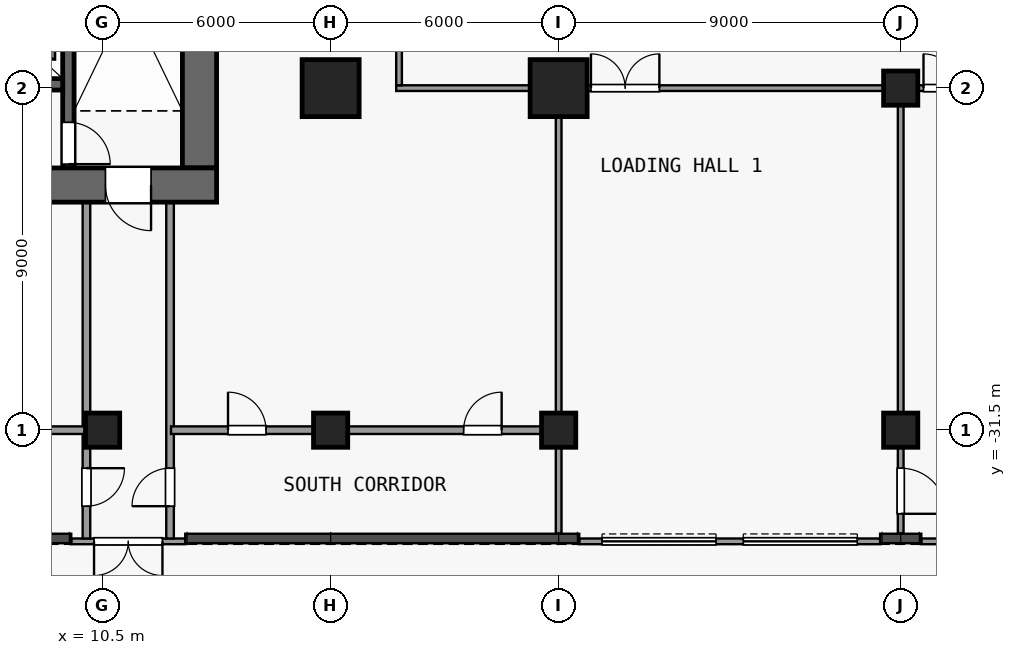
"""IFC4 building model, lengths in metres.
Left out: names, types, materials, properties, quantities, classifications, styles, units other than length and angle.
Written with IfcOpenShell. Run it as: python <this file> out.ifc"""

import sys

from ifc_helpers import new_model, si_unit, direction, frame, frame_2d, origin, origin_2d, place, context, subcontext, project, spatial, rectangle, extrude, element, fill, save


model = new_model("IFC4")
c1 = context("Model", 3, precision=1e-05, world=origin(), true_north=direction((0.0, 1.0)))
c2 = subcontext(c1, "Body", "Model", "MODEL_VIEW")
j1 = project(units=[si_unit("LENGTHUNIT", "METRE"), si_unit("PLANEANGLEUNIT", "RADIAN")], contexts=[c1])
p1 = place(None, origin())
s1 = spatial("IfcSite", under=j1, at=p1, CompositionType="ELEMENT")
p2 = place(p1, origin())
s2 = spatial("IfcBuilding", under=s1, at=p2, CompositionType="ELEMENT")
p3 = place(p2, origin())
s3 = spatial("IfcBuildingStorey", under=s2, at=p3, CompositionType="ELEMENT", Elevation=0.0)
for number, where, z_axis, x_axis in (
    (1, (10.5, -31.5, 0.0), (0.0, 0.0, 1.0), (1.0, 0.0, 0.0)),
    (2, (16.5, -31.5, 0.0), (0.0, 0.0, 1.0), (1.0, 0.0, 0.0)),
):
    element("IfcColumn", number, at=place(p3, frame(where, z_axis=z_axis, x_axis=x_axis)), inside=s3, PredefinedType="COLUMN", context=c2, shape_type="SweptSolid", body=[
        extrude(rectangle(XDim=0.9, YDim=0.9, at=origin_2d()), origin(), (0.0, 0.0, 1.0), 8.0),
    ])
p4 = place(p3, frame((16.5, -22.5, 0.0), z_axis=(0.0, 0.0, 1.0), x_axis=(1.0, 0.0, 0.0)))
e3 = element("IfcColumn", 3, at=p4, inside=s3, PredefinedType="COLUMN", context=c2, shape_type="SweptSolid", body=[
    extrude(rectangle(XDim=1.5, YDim=1.5, at=origin_2d()), origin(), (0.0, 0.0, 1.0), 8.0),
])
p5 = place(p3, frame((22.5, -31.5, 0.0), z_axis=(0.0, 0.0, 1.0), x_axis=(1.0, 0.0, 0.0)))
e4 = element("IfcColumn", 4, at=p5, inside=s3, PredefinedType="COLUMN", context=c2, shape_type="SweptSolid", body=[
    extrude(rectangle(XDim=0.9, YDim=0.9, at=origin_2d()), origin(), (0.0, 0.0, 1.0), 8.0),
])
p6 = place(p3, frame((22.5, -22.5, 0.0), z_axis=(0.0, 0.0, 1.0), x_axis=(1.0, 0.0, 0.0)))
e5 = element("IfcColumn", 5, at=p6, inside=s3, PredefinedType="COLUMN", context=c2, shape_type="SweptSolid", body=[
    extrude(rectangle(XDim=1.5, YDim=1.5, at=origin_2d()), origin(), (0.0, 0.0, 1.0), 8.0),
])
for number, where, z_axis, x_axis in (
    (6, (31.5, -31.5, 0.0), (0.0, 0.0, 1.0), (1.0, 0.0, 0.0)),
    (7, (31.5, -22.5, 0.0), (0.0, 0.0, 1.0), (1.0, 0.0, 0.0)),
):
    element("IfcColumn", number, at=place(p3, frame(where, z_axis=z_axis, x_axis=x_axis)), inside=s3, PredefinedType="COLUMN", context=c2, shape_type="SweptSolid", body=[
        extrude(rectangle(XDim=0.9, YDim=0.9, at=origin_2d()), origin(), (0.0, 0.0, 1.0), 8.0),
    ])
p7 = place(p3, frame((13.5, -25.05, 0.0), z_axis=(0.0, 0.0, 1.0), x_axis=(-1.0, 0.0, 0.0)))
e8 = element("IfcWall", 8, at=p7, inside=s3, PredefinedType="SHEAR", context=c2, shape_type="SweptSolid", body=[
    extrude(rectangle(XDim=27.0, YDim=0.9, at=frame_2d((13.5, 0.0))), origin(), (0.0, 0.0, 1.0), 7.65),
])
p8 = place(p7, frame((24.075, 0.0, 0.0)))
e9 = element("IfcOpeningElement", 9, at=p8, cuts=e8, PredefinedType="OPENING", context=c2, shape_type="SweptSolid", body=[
    extrude(rectangle(XDim=1.2, YDim=2.1, at=frame_2d((0.6, 1.05))), frame((0.0, 0.46, 0.0), z_axis=(0.0, -1.0, 0.0), x_axis=(1.0, 0.0, 0.0)), (0.0, 0.0, 1.0), 0.92),
])
p9 = place(p7, frame((1.725, 0.0, 0.0)))
e10 = element("IfcOpeningElement", 10, at=p9, cuts=e8, PredefinedType="OPENING", context=c2, shape_type="SweptSolid", body=[
    extrude(rectangle(XDim=1.2, YDim=2.1, at=frame_2d((0.6, 1.05))), frame((0.0, 0.46, 0.0), z_axis=(0.0, -1.0, 0.0), x_axis=(1.0, 0.0, 0.0)), (0.0, 0.0, 1.0), 0.92),
])
p10 = place(p3, frame((13.05, -24.6, 0.0), z_axis=(0.0, 0.0, 1.0), x_axis=(0.0, 1.0, 0.0)))
e11 = element("IfcWall", 11, at=p10, inside=s3, PredefinedType="SHEAR", context=c2, shape_type="SweptSolid", body=[
    extrude(rectangle(XDim=16.1, YDim=0.9, at=frame_2d((8.05, 0.0))), origin(), (0.0, 0.0, 1.0), 7.65),
])
p11 = place(p3, frame((6.35, -22.4, 0.0), z_axis=(0.0, 0.0, 1.0), x_axis=(1.0, 0.0, 0.0)))
e12 = element("IfcWall", 12, at=p11, inside=s3, PredefinedType="SHEAR", context=c2, shape_type="SweptSolid", body=[
    extrude(rectangle(XDim=3.1, YDim=0.3, at=frame_2d((1.55, 0.0))), origin(), (0.0, 0.0, 1.0), 7.65),
])
p12 = place(p3, frame((9.6, -16.9, 0.0), z_axis=(0.0, 0.0, 1.0), x_axis=(0.0, -1.0, 0.0)))
e13 = element("IfcWall", 13, at=p12, inside=s3, PredefinedType="SHEAR", context=c2, shape_type="SweptSolid", body=[
    extrude(rectangle(XDim=7.7, YDim=0.3, at=frame_2d((3.85, 0.0))), origin(), (0.0, 0.0, 1.0), 7.65),
])
p13 = place(p12, frame((6.5, 0.0, 0.0)))
e14 = element("IfcOpeningElement", 14, at=p13, cuts=e13, PredefinedType="OPENING", context=c2, shape_type="SweptSolid", body=[
    extrude(rectangle(XDim=1.1, YDim=2.1, at=frame_2d((0.55, 1.05))), frame((0.0, 0.16, 0.0), z_axis=(0.0, -1.0, 0.0), x_axis=(1.0, 0.0, 0.0)), (0.0, 0.0, 1.0), 0.32),
])
p14 = place(p3, frame((10.075, -25.5, 0.0), z_axis=(0.0, 0.0, 1.0), x_axis=(0.0, -1.0, 0.0)))
e15 = element("IfcWall", 15, at=p14, inside=s3, PredefinedType="PARTITIONING", context=c2, shape_type="SweptSolid", body=[
    extrude(rectangle(XDim=8.85, YDim=0.2, at=frame_2d((4.425, 0.0))), origin(), (0.0, 0.0, 1.0), 7.65),
])
p15 = place(p14, frame((7.0, 0.0, 0.0)))
e16 = element("IfcOpeningElement", 16, at=p15, cuts=e15, PredefinedType="OPENING", context=c2, shape_type="SweptSolid", body=[
    extrude(rectangle(XDim=1.0, YDim=2.1, at=frame_2d((0.5, 1.05))), frame((0.0, 0.11, 0.0), z_axis=(0.0, -1.0, 0.0), x_axis=(1.0, 0.0, 0.0)), (0.0, 0.0, 1.0), 0.22),
])
p16 = place(p3, frame((12.275, -34.35, 0.0), z_axis=(0.0, 0.0, 1.0), x_axis=(0.0, 1.0, 0.0)))
e17 = element("IfcWall", 17, at=p16, inside=s3, PredefinedType="PARTITIONING", context=c2, shape_type="SweptSolid", body=[
    extrude(rectangle(XDim=8.85, YDim=0.2, at=frame_2d((4.425, 0.0))), origin(), (0.0, 0.0, 1.0), 7.65),
])
p17 = place(p16, frame((0.85, 0.0, 0.0)))
e18 = element("IfcOpeningElement", 18, at=p17, cuts=e17, PredefinedType="OPENING", context=c2, shape_type="SweptSolid", body=[
    extrude(rectangle(XDim=1.0, YDim=2.1, at=frame_2d((0.5, 1.05))), frame((0.0, 0.11, 0.0), z_axis=(0.0, -1.0, 0.0), x_axis=(1.0, 0.0, 0.0)), (0.0, 0.0, 1.0), 0.22),
])
p18 = place(p3, frame((18.225, -22.5, 0.0), z_axis=(0.0, 0.0, 1.0), x_axis=(1.0, 0.0, 0.0)))
e19 = element("IfcWall", 19, at=p18, inside=s3, PredefinedType="PARTITIONING", context=c2, shape_type="SweptSolid", body=[
    extrude(rectangle(XDim=3.525, YDim=0.15, at=frame_2d((1.762, 0.0))), origin(), (0.0, 0.0, 1.0), 7.65),
])
p19 = place(p3, frame((23.25, -22.5, 0.0), z_axis=(0.0, 0.0, 1.0), x_axis=(1.0, 0.0, 0.0)))
e20 = element("IfcWall", 20, at=p19, inside=s3, PredefinedType="PARTITIONING", context=c2, shape_type="SweptSolid", body=[
    extrude(rectangle(XDim=7.8, YDim=0.15, at=frame_2d((3.9, 0.0))), origin(), (0.0, 0.0, 1.0), 7.65),
])
p20 = place(p19, frame((0.1, 0.0, 0.0)))
e21 = element("IfcOpeningElement", 21, at=p20, cuts=e20, PredefinedType="OPENING", context=c2, shape_type="SweptSolid", body=[
    extrude(rectangle(XDim=1.8, YDim=2.1, at=frame_2d((0.9, 1.05))), frame((0.0, 0.085, 0.0), z_axis=(0.0, -1.0, 0.0), x_axis=(1.0, 0.0, 0.0)), (0.0, 0.0, 1.0), 0.17),
])
p21 = place(p3, frame((31.95, -22.5, 0.0), z_axis=(0.0, 0.0, 1.0), x_axis=(1.0, 0.0, 0.0)))
e22 = element("IfcWall", 22, at=p21, inside=s3, PredefinedType="PARTITIONING", context=c2, shape_type="SweptSolid", body=[
    extrude(rectangle(XDim=8.1, YDim=0.15, at=frame_2d((4.05, 0.0))), origin(), (0.0, 0.0, 1.0), 7.65),
])
p22 = place(p21, frame((0.15, 0.0, 0.0)))
e23 = element("IfcOpeningElement", 23, at=p22, cuts=e22, PredefinedType="OPENING", context=c2, shape_type="SweptSolid", body=[
    extrude(rectangle(XDim=1.8, YDim=2.1, at=frame_2d((0.9, 1.05))), frame((0.0, 0.085, 0.0), z_axis=(0.0, -1.0, 0.0), x_axis=(1.0, 0.0, 0.0)), (0.0, 0.0, 1.0), 0.17),
])
p23 = place(p3, frame((18.3, -22.425, 0.0), z_axis=(0.0, 0.0, 1.0), x_axis=(0.0, 1.0, 0.0)))
e24 = element("IfcWall", 24, at=p23, inside=s3, PredefinedType="PARTITIONING", context=c2, shape_type="SweptSolid", body=[
    extrude(rectangle(XDim=14.45, YDim=0.15, at=frame_2d((7.225, 0.0))), origin(), (0.0, 0.0, 1.0), 7.65),
])
p24 = place(p3, frame((22.5, -34.225, 0.0), z_axis=(0.0, 0.0, 1.0), x_axis=(0.0, 1.0, 0.0)))
e25 = element("IfcWall", 25, at=p24, inside=s3, PredefinedType="PARTITIONING", context=c2, shape_type="SweptSolid", body=[
    extrude(rectangle(XDim=2.275, YDim=0.15, at=frame_2d((1.138, 0.0))), origin(), (0.0, 0.0, 1.0), 7.65),
])
p25 = place(p3, frame((22.5, -31.05, 0.0), z_axis=(0.0, 0.0, 1.0), x_axis=(0.0, 1.0, 0.0)))
e26 = element("IfcWall", 26, at=p25, inside=s3, PredefinedType="PARTITIONING", context=c2, shape_type="SweptSolid", body=[
    extrude(rectangle(XDim=7.8, YDim=0.15, at=frame_2d((3.9, 0.0))), origin(), (0.0, 0.0, 1.0), 7.65),
])
p26 = place(p3, frame((31.5, -31.95, 0.0), z_axis=(0.0, 0.0, 1.0), x_axis=(0.0, -1.0, 0.0)))
e27 = element("IfcWall", 27, at=p26, inside=s3, PredefinedType="PARTITIONING", context=c2, shape_type="SweptSolid", body=[
    extrude(rectangle(XDim=2.275, YDim=0.15, at=frame_2d((1.138, 0.0))), origin(), (0.0, 0.0, 1.0), 7.65),
])
p27 = place(p26, frame((0.55, 0.0, 0.0)))
e28 = element("IfcOpeningElement", 28, at=p27, cuts=e27, PredefinedType="OPENING", context=c2, shape_type="SweptSolid", body=[
    extrude(rectangle(XDim=1.2, YDim=2.1, at=frame_2d((0.6, 1.05))), frame((0.0, 0.085, 0.0), z_axis=(0.0, -1.0, 0.0), x_axis=(1.0, 0.0, 0.0)), (0.0, 0.0, 1.0), 0.17),
])
p28 = place(p3, frame((31.5, -31.05, 0.0), z_axis=(0.0, 0.0, 1.0), x_axis=(0.0, 1.0, 0.0)))
e29 = element("IfcWall", 29, at=p28, inside=s3, PredefinedType="PARTITIONING", context=c2, shape_type="SweptSolid", body=[
    extrude(rectangle(XDim=8.1, YDim=0.15, at=frame_2d((4.05, 0.0))), origin(), (0.0, 0.0, 1.0), 7.65),
])
p29 = place(p3, frame((12.675, -34.425, 0.0), z_axis=(0.0, 0.0, 1.0), x_axis=(-1.0, 0.0, 0.0)))
e30 = element("IfcWall", 30, at=p29, inside=s3, PredefinedType="SOLIDWALL", context=c2, shape_type="SweptSolid", body=[
    extrude(rectangle(XDim=3.0, YDim=0.15, at=frame_2d((1.5, 0.0))), origin(), (0.0, 0.0, 1.0), 7.65),
])
p30 = place(p29, frame((0.6, 0.0, 0.0)))
e31 = element("IfcOpeningElement", 31, at=p30, cuts=e30, PredefinedType="OPENING", context=c2, shape_type="SweptSolid", body=[
    extrude(rectangle(XDim=1.8, YDim=2.1, at=frame_2d((0.9, 1.05))), frame((0.0, 0.085, 0.0), z_axis=(0.0, -1.0, 0.0), x_axis=(1.0, 0.0, 0.0)), (0.0, 0.0, 1.0), 0.17),
])
p31 = place(p3, frame((30.958, -34.425, 0.0), z_axis=(0.0, 0.0, 1.0), x_axis=(-1.0, 0.0, 0.0)))
e32 = element("IfcWall", 32, at=p31, inside=s3, PredefinedType="SOLIDWALL", context=c2, shape_type="SweptSolid", body=[
    extrude(rectangle(XDim=7.917, YDim=0.15, at=frame_2d((3.958, 0.0))), origin(), (0.0, 0.0, 1.0), 7.65),
])
p32 = place(p31, frame((4.317, 0.0, 0.0)))
e33 = element("IfcOpeningElement", 33, at=p32, cuts=e32, PredefinedType="OPENING", context=c2, shape_type="SweptSolid", body=[
    extrude(rectangle(XDim=3.0, YDim=4.3, at=frame_2d((1.5, 2.15))), frame((0.0, 0.085, 0.0), z_axis=(0.0, -1.0, 0.0), x_axis=(1.0, 0.0, 0.0)), (0.0, 0.0, 1.0), 0.17),
])
p33 = place(p31, frame((0.6, 0.0, 0.0)))
e34 = element("IfcOpeningElement", 34, at=p33, cuts=e32, PredefinedType="OPENING", context=c2, shape_type="SweptSolid", body=[
    extrude(rectangle(XDim=3.0, YDim=4.3, at=frame_2d((1.5, 2.15))), frame((0.0, 0.085, 0.0), z_axis=(0.0, -1.0, 0.0), x_axis=(1.0, 0.0, 0.0)), (0.0, 0.0, 1.0), 0.17),
])
p34 = place(p3, frame((39.958, -34.425, 0.0), z_axis=(0.0, 0.0, 1.0), x_axis=(-1.0, 0.0, 0.0)))
e35 = element("IfcWall", 35, at=p34, inside=s3, PredefinedType="SOLIDWALL", context=c2, shape_type="SweptSolid", body=[
    extrude(rectangle(XDim=7.917, YDim=0.15, at=frame_2d((3.958, 0.0))), origin(), (0.0, 0.0, 1.0), 7.65),
])
p35 = place(p34, frame((4.317, 0.0, 0.0)))
e36 = element("IfcOpeningElement", 36, at=p35, cuts=e35, PredefinedType="OPENING", context=c2, shape_type="SweptSolid", body=[
    extrude(rectangle(XDim=3.0, YDim=4.3, at=frame_2d((1.5, 2.15))), frame((0.0, 0.085, 0.0), z_axis=(0.0, -1.0, 0.0), x_axis=(1.0, 0.0, 0.0)), (0.0, 0.0, 1.0), 0.17),
])
p36 = place(p34, frame((0.6, 0.0, 0.0)))
e37 = element("IfcOpeningElement", 37, at=p36, cuts=e35, PredefinedType="OPENING", context=c2, shape_type="SweptSolid", body=[
    extrude(rectangle(XDim=3.0, YDim=4.3, at=frame_2d((1.5, 2.15))), frame((0.0, 0.085, 0.0), z_axis=(0.0, -1.0, 0.0), x_axis=(1.0, 0.0, 0.0)), (0.0, 0.0, 1.0), 0.17),
])
p37 = place(p3, frame((-10.05, -31.5, 0.0), z_axis=(0.0, 0.0, 1.0), x_axis=(1.0, 0.0, 0.0)))
e38 = element("IfcWall", 38, at=p37, inside=s3, PredefinedType="PARTITIONING", context=c2, shape_type="SweptSolid", body=[
    extrude(rectangle(XDim=20.1, YDim=0.2, at=frame_2d((10.05, 0.0))), origin(), (0.0, 0.0, 1.0), 7.65),
])
p38 = place(p37, frame((3.5, 0.0, 0.0)))
e39 = element("IfcOpeningElement", 39, at=p38, cuts=e38, PredefinedType="OPENING", context=c2, shape_type="SweptSolid", body=[
    extrude(rectangle(XDim=1.0, YDim=2.1, at=frame_2d((0.5, 1.05))), frame((0.0, 0.11, 0.0), z_axis=(0.0, -1.0, 0.0), x_axis=(1.0, 0.0, 0.0)), (0.0, 0.0, 1.0), 0.22),
])
p39 = place(p37, frame((15.6, 0.0, 0.0)))
e40 = element("IfcOpeningElement", 40, at=p39, cuts=e38, PredefinedType="OPENING", context=c2, shape_type="SweptSolid", body=[
    extrude(rectangle(XDim=1.0, YDim=2.1, at=frame_2d((0.5, 1.05))), frame((0.0, 0.11, 0.0), z_axis=(0.0, -1.0, 0.0), x_axis=(1.0, 0.0, 0.0)), (0.0, 0.0, 1.0), 0.22),
])
p40 = place(p3, frame((12.3, -31.5, 0.0), z_axis=(0.0, 0.0, 1.0), x_axis=(1.0, 0.0, 0.0)))
e41 = element("IfcWall", 41, at=p40, inside=s3, PredefinedType="PARTITIONING", context=c2, shape_type="SweptSolid", body=[
    extrude(rectangle(XDim=10.2, YDim=0.2, at=frame_2d((5.1, 0.0))), origin(), (0.0, 0.0, 1.0), 7.65),
])
p41 = place(p40, frame((1.5, 0.0, 0.0)))
e42 = element("IfcOpeningElement", 42, at=p41, cuts=e41, PredefinedType="OPENING", context=c2, shape_type="SweptSolid", body=[
    extrude(rectangle(XDim=1.0, YDim=2.1, at=frame_2d((0.5, 1.05))), frame((0.0, 0.11, 0.0), z_axis=(0.0, -1.0, 0.0), x_axis=(1.0, 0.0, 0.0)), (0.0, 0.0, 1.0), 0.22),
])
p42 = place(p40, frame((7.7, 0.0, 0.0)))
e43 = element("IfcOpeningElement", 43, at=p42, cuts=e41, PredefinedType="OPENING", context=c2, shape_type="SweptSolid", body=[
    extrude(rectangle(XDim=1.0, YDim=2.1, at=frame_2d((0.5, 1.05))), frame((0.0, 0.11, 0.0), z_axis=(0.0, -1.0, 0.0), x_axis=(1.0, 0.0, 0.0)), (0.0, 0.0, 1.0), 0.22),
])
p43 = place(p9, origin())
e44 = element("IfcDoor", 44, at=p43, inside=s3, OperationType="SINGLE_SWING_LEFT", PredefinedType="DOOR", context=c2, shape_type="SweptSolid", body=[
    extrude(rectangle(XDim=1.2, YDim=2.1, at=frame_2d((0.6, 1.05))), frame((0.0, 0.025, 0.0), z_axis=(0.0, -1.0, 0.0), x_axis=(1.0, 0.0, 0.0)), (0.0, 0.0, 1.0), 0.05),
])
fill(e10, e44)
p44 = place(p13, origin())
e45 = element("IfcDoor", 45, at=p44, inside=s3, OperationType="SINGLE_SWING_RIGHT", PredefinedType="DOOR", context=c2, shape_type="SweptSolid", body=[
    extrude(rectangle(XDim=1.1, YDim=2.1, at=frame_2d((0.55, 1.05))), frame((0.0, 0.025, 0.0), z_axis=(0.0, -1.0, 0.0), x_axis=(1.0, 0.0, 0.0)), (0.0, 0.0, 1.0), 0.05),
])
fill(e14, e45)
p45 = place(p15, origin())
e46 = element("IfcDoor", 46, at=p45, inside=s3, OperationType="SINGLE_SWING_LEFT", PredefinedType="DOOR", context=c2, shape_type="SweptSolid", body=[
    extrude(rectangle(XDim=1.0, YDim=2.1, at=frame_2d((0.5, 1.05))), frame((0.0, 0.025, 0.0), z_axis=(0.0, -1.0, 0.0), x_axis=(1.0, 0.0, 0.0)), (0.0, 0.0, 1.0), 0.05),
])
fill(e16, e46)
p46 = place(p17, origin())
e47 = element("IfcDoor", 47, at=p46, inside=s3, OperationType="SINGLE_SWING_LEFT", PredefinedType="DOOR", context=c2, shape_type="SweptSolid", body=[
    extrude(rectangle(XDim=1.0, YDim=2.1, at=frame_2d((0.5, 1.05))), frame((0.0, 0.025, 0.0), z_axis=(0.0, -1.0, 0.0), x_axis=(1.0, 0.0, 0.0)), (0.0, 0.0, 1.0), 0.05),
])
fill(e18, e47)
p47 = place(p27, origin())
e48 = element("IfcDoor", 48, at=p47, inside=s3, OperationType="SINGLE_SWING_RIGHT", PredefinedType="DOOR", context=c2, shape_type="SweptSolid", body=[
    extrude(rectangle(XDim=1.2, YDim=2.1, at=frame_2d((0.6, 1.05))), frame((0.0, 0.025, 0.0), z_axis=(0.0, -1.0, 0.0), x_axis=(1.0, 0.0, 0.0)), (0.0, 0.0, 1.0), 0.05),
])
fill(e28, e48)
p48 = place(p20, origin())
e49 = element("IfcDoor", 49, at=p48, inside=s3, OperationType="DOUBLE_DOOR_SINGLE_SWING", PredefinedType="DOOR", context=c2, shape_type="SweptSolid", body=[
    extrude(rectangle(XDim=1.8, YDim=2.1, at=frame_2d((0.9, 1.05))), frame((0.0, 0.025, 0.0), z_axis=(0.0, -1.0, 0.0), x_axis=(1.0, 0.0, 0.0)), (0.0, 0.0, 1.0), 0.05),
])
fill(e21, e49)
p49 = place(p22, origin())
e50 = element("IfcDoor", 50, at=p49, inside=s3, OperationType="DOUBLE_DOOR_SINGLE_SWING", PredefinedType="DOOR", context=c2, shape_type="SweptSolid", body=[
    extrude(rectangle(XDim=1.8, YDim=2.1, at=frame_2d((0.9, 1.05))), frame((0.0, 0.025, 0.0), z_axis=(0.0, -1.0, 0.0), x_axis=(1.0, 0.0, 0.0)), (0.0, 0.0, 1.0), 0.05),
])
fill(e23, e50)
p50 = place(p30, origin())
e51 = element("IfcDoor", 51, at=p50, inside=s3, OperationType="DOUBLE_DOOR_SINGLE_SWING", PredefinedType="DOOR", context=c2, shape_type="SweptSolid", body=[
    extrude(rectangle(XDim=1.8, YDim=2.1, at=frame_2d((0.9, 1.05))), frame((0.0, 0.025, 0.0), z_axis=(0.0, -1.0, 0.0), x_axis=(1.0, 0.0, 0.0)), (0.0, 0.0, 1.0), 0.05),
])
fill(e31, e51)
p51 = place(p32, origin())
e52 = element("IfcDoor", 52, at=p51, inside=s3, OperationType="ROLLINGUP", PredefinedType="DOOR", context=c2, shape_type="SweptSolid", body=[
    extrude(rectangle(XDim=3.0, YDim=4.3, at=frame_2d((1.5, 2.15))), frame((0.0, 0.025, 0.0), z_axis=(0.0, -1.0, 0.0), x_axis=(1.0, 0.0, 0.0)), (0.0, 0.0, 1.0), 0.05),
])
fill(e33, e52)
p52 = place(p33, origin())
e53 = element("IfcDoor", 53, at=p52, inside=s3, OperationType="ROLLINGUP", PredefinedType="DOOR", context=c2, shape_type="SweptSolid", body=[
    extrude(rectangle(XDim=3.0, YDim=4.3, at=frame_2d((1.5, 2.15))), frame((0.0, 0.025, 0.0), z_axis=(0.0, -1.0, 0.0), x_axis=(1.0, 0.0, 0.0)), (0.0, 0.0, 1.0), 0.05),
])
fill(e34, e53)
p53 = place(p41, origin())
e54 = element("IfcDoor", 54, at=p53, inside=s3, OperationType="SINGLE_SWING_RIGHT", PredefinedType="DOOR", context=c2, shape_type="SweptSolid", body=[
    extrude(rectangle(XDim=1.0, YDim=2.1, at=frame_2d((0.5, 1.05))), frame((0.0, 0.025, 0.0), z_axis=(0.0, -1.0, 0.0), x_axis=(1.0, 0.0, 0.0)), (0.0, 0.0, 1.0), 0.05),
])
fill(e42, e54)
p54 = place(p42, origin())
e55 = element("IfcDoor", 55, at=p54, inside=s3, OperationType="SINGLE_SWING_LEFT", PredefinedType="DOOR", context=c2, shape_type="SweptSolid", body=[
    extrude(rectangle(XDim=1.0, YDim=2.1, at=frame_2d((0.5, 1.05))), frame((0.0, 0.025, 0.0), z_axis=(0.0, -1.0, 0.0), x_axis=(1.0, 0.0, 0.0)), (0.0, 0.0, 1.0), 0.05),
])
fill(e43, e55)
save(model, sys.argv[1])
